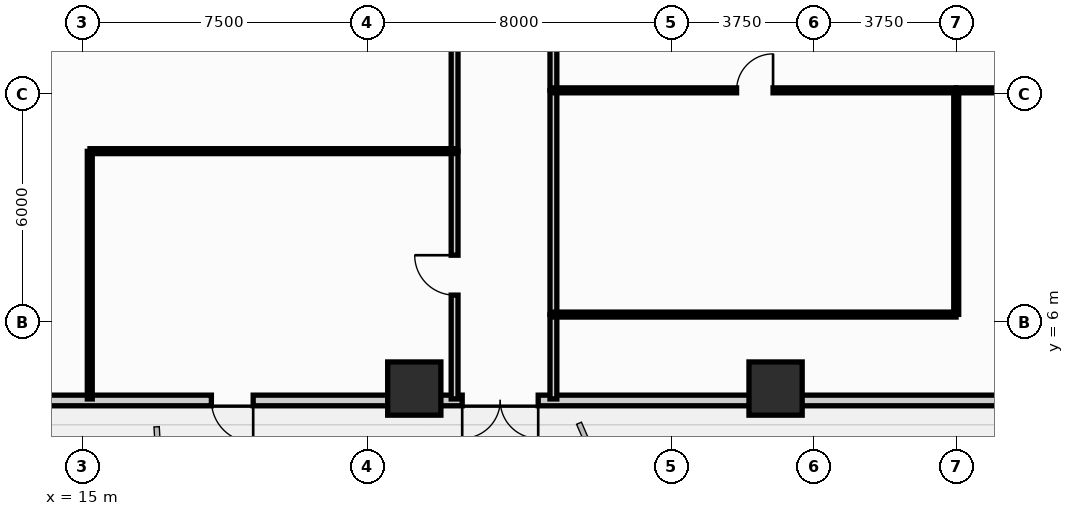
"""IFC4 building model, lengths in metres.
Left out: names, types, materials, properties, quantities, classifications, styles, units other than length and angle.
Written with IfcOpenShell. Run it as: python <this file> out.ifc"""

import sys

from ifc_helpers import new_model, si_unit, direction, frame, frame_2d, origin, origin_2d, place, context, subcontext, project, spatial, rectangle, hollow_rectangle, extrude, source, transform, mapped, element, fill, save


model = new_model("IFC4")
c1 = context("Model", 3, precision=1e-05, world=origin(), true_north=direction((0.0, 1.0)))
c2 = subcontext(c1, "Body", "Model", "MODEL_VIEW")
j1 = project(units=[si_unit("LENGTHUNIT", "METRE"), si_unit("PLANEANGLEUNIT", "RADIAN")], contexts=[c1])
p1 = place(None, origin())
s1 = spatial("IfcSite", under=j1, at=p1, CompositionType="ELEMENT")
p2 = place(p1, origin())
s2 = spatial("IfcBuilding", under=s1, at=p2, CompositionType="ELEMENT")
p3 = place(p2, origin())
s3 = spatial("IfcBuildingStorey", under=s2, at=p3, CompositionType="ELEMENT", Elevation=0.0)
m1 = source(origin(), c2, "Body", "SweptSolid", [
    extrude(hollow_rectangle(XDim=1.4, YDim=1.4, WallThickness=0.08, at=origin_2d()), origin(), (0.0, 0.0, 1.0), 5.401),
])
p4 = place(p3, frame((23.739, 4.253, 0.0), z_axis=(-0.013469326265, 0.019797197665, 0.999713283004), x_axis=(-0.826786039216, -0.562516528964, 0.0)))
e1 = element("IfcColumn", 1, at=p4, inside=s3, PredefinedType="COLUMN", context=c2, shape_type="MappedRepresentation", body=[
    mapped(m1, transform((0.0, 0.0, 0.0), scale=1.0)),
])
m2 = source(origin(), c2, "Body", "SweptSolid", [
    extrude(hollow_rectangle(XDim=1.4, YDim=1.4, WallThickness=0.08, at=origin_2d()), origin(), (0.0, 0.0, 1.0), 5.401),
])
p5 = place(p3, frame((33.246, 4.253, 0.0), z_axis=(-0.004475070213, 0.01979879549, 0.999793969498), x_axis=(-0.975394678041, -0.220465920379, 0.0)))
e2 = element("IfcColumn", 2, at=p5, inside=s3, PredefinedType="COLUMN", context=c2, shape_type="MappedRepresentation", body=[
    mapped(m2, transform((0.0, 0.0, 0.0), scale=1.0)),
])
p6 = place(p3, frame((45.0, 3.94, 0.0), z_axis=(0.0, 0.0, 1.0), x_axis=(-1.0, 0.0, 0.0)))
e3 = element("IfcWall", 3, at=p6, inside=s3, PredefinedType="STANDARD", context=c2, shape_type="SweptSolid", body=[
    extrude(rectangle(XDim=41.06, YDim=0.28, at=frame_2d((20.53, 0.0))), origin(), (0.0, 0.0, 1.0), 4.065),
])
p7 = place(p6, frame((18.0, 0.0, 0.0)))
e4 = element("IfcOpeningElement", 4, at=p7, cuts=e3, PredefinedType="OPENING", context=c2, shape_type="SweptSolid", body=[
    extrude(rectangle(XDim=2.0, YDim=2.4, at=frame_2d((1.0, 1.2))), frame((0.0, 0.152, 0.0), z_axis=(0.0, -1.0, 0.0), x_axis=(1.0, 0.0, 0.0)), (0.0, 0.0, 1.0), 0.304),
])
p8 = place(p6, frame((25.5, 0.0, 0.0)))
e5 = element("IfcOpeningElement", 5, at=p8, cuts=e3, PredefinedType="OPENING", context=c2, shape_type="SweptSolid", body=[
    extrude(rectangle(XDim=1.1, YDim=2.2, at=frame_2d((0.55, 1.1))), frame((0.0, 0.152, 0.0), z_axis=(0.0, -1.0, 0.0), x_axis=(1.0, 0.0, 0.0)), (0.0, 0.0, 1.0), 0.304),
])
p9 = place(p6, frame((33.16, 0.0, 1.0)))
e6 = element("IfcOpeningElement", 6, at=p9, cuts=e3, PredefinedType="OPENING", context=c2, shape_type="SweptSolid", body=[
    extrude(rectangle(XDim=2.4, YDim=1.95, at=frame_2d((1.2, 0.975))), frame((0.0, 0.152, 0.0), z_axis=(0.0, -1.0, 0.0), x_axis=(1.0, 0.0, 0.0)), (0.0, 0.0, 1.0), 0.304),
])
p10 = place(p3, frame((24.8, 10.505, 0.0), z_axis=(0.0, 0.0, 1.0), x_axis=(0.0, 1.0, 0.0)))
e7 = element("IfcWall", 7, at=p10, inside=s3, PredefinedType="PARTITIONING", context=c2, shape_type="SweptSolid", body=[
    extrude(rectangle(XDim=19.59, YDim=0.18, at=frame_2d((9.795, 0.0))), origin(), (0.0, 0.0, 1.0), 4.706),
])
p11 = place(p3, frame((24.8, 3.98, 0.0), z_axis=(0.0, 0.0, 1.0), x_axis=(0.0, 1.0, 0.0)))
e8 = element("IfcWall", 8, at=p11, inside=s3, PredefinedType="PARTITIONING", context=c2, shape_type="SweptSolid", body=[
    extrude(rectangle(XDim=6.515, YDim=0.18, at=frame_2d((3.258, 0.0))), origin(), (0.0, 0.0, 1.0), 5.08),
])
p12 = place(p11, frame((2.732, 0.0, 0.0)))
e9 = element("IfcOpeningElement", 9, at=p12, cuts=e8, PredefinedType="OPENING", context=c2, shape_type="SweptSolid", body=[
    extrude(rectangle(XDim=1.05, YDim=2.15, at=frame_2d((0.525, 1.075))), frame((0.0, 0.102, 0.0), z_axis=(0.0, -1.0, 0.0), x_axis=(1.0, 0.0, 0.0)), (0.0, 0.0, 1.0), 0.204),
])
p13 = place(p3, frame((27.4, 6.205, 0.0), z_axis=(0.0, 0.0, 1.0), x_axis=(0.0, 1.0, 0.0)))
e10 = element("IfcWall", 10, at=p13, inside=s3, PredefinedType="PARTITIONING", context=c2, shape_type="SweptSolid", body=[
    extrude(rectangle(XDim=5.89, YDim=0.18, at=frame_2d((2.945, 0.0))), origin(), (0.0, 0.0, 1.0), 5.08),
])
p14 = place(p3, frame((27.4, 3.98, 0.0), z_axis=(0.0, 0.0, 1.0), x_axis=(0.0, 1.0, 0.0)))
e11 = element("IfcWall", 11, at=p14, inside=s3, PredefinedType="PARTITIONING", context=c2, shape_type="SweptSolid", body=[
    extrude(rectangle(XDim=2.215, YDim=0.18, at=frame_2d((1.107, 0.0))), origin(), (0.0, 0.0, 1.0), 5.08),
])
p15 = place(p3, frame((27.4, 12.105, 0.0), z_axis=(0.0, 0.0, 1.0), x_axis=(0.0, 1.0, 0.0)))
e12 = element("IfcWall", 12, at=p15, inside=s3, PredefinedType="PARTITIONING", context=c2, shape_type="SweptSolid", body=[
    extrude(rectangle(XDim=2.19, YDim=0.18, at=frame_2d((1.095, 0.0))), origin(), (0.0, 0.0, 1.0), 5.08),
])
p16 = place(p3, frame((38.005, 12.1, 0.0), z_axis=(0.0, 0.0, 1.0), x_axis=(1.0, 0.0, 0.0)))
e13 = element("IfcWall", 13, at=p16, inside=s3, PredefinedType="PARTITIONING", context=c2, shape_type="SweptSolid", body=[
    extrude(rectangle(XDim=10.59, YDim=0.13, at=frame_2d((5.295, 0.0))), origin(), (0.0, 0.0, 1.0), 5.08),
])
p17 = place(p3, frame((27.405, 12.1, 0.0), z_axis=(0.0, 0.0, 1.0), x_axis=(1.0, 0.0, 0.0)))
e14 = element("IfcWall", 14, at=p17, inside=s3, PredefinedType="PARTITIONING", context=c2, shape_type="SweptSolid", body=[
    extrude(rectangle(XDim=10.59, YDim=0.13, at=frame_2d((5.295, 0.0))), origin(), (0.0, 0.0, 1.0), 5.08),
])
p18 = place(p17, frame((4.815, 0.0, 0.0)))
e15 = element("IfcOpeningElement", 15, at=p18, cuts=e14, PredefinedType="OPENING", context=c2, shape_type="SweptSolid", body=[
    extrude(rectangle(XDim=0.96, YDim=2.15, at=frame_2d((0.48, 1.075))), frame((0.0, 0.077, 0.0), z_axis=(0.0, -1.0, 0.0), x_axis=(1.0, 0.0, 0.0)), (0.0, 0.0, 1.0), 0.154),
])
p19 = place(p3, frame((27.405, 6.2, 0.0), z_axis=(0.0, 0.0, 1.0), x_axis=(1.0, 0.0, 0.0)))
e16 = element("IfcWall", 16, at=p19, inside=s3, PredefinedType="PARTITIONING", context=c2, shape_type="SweptSolid", body=[
    extrude(rectangle(XDim=10.59, YDim=0.13, at=frame_2d((5.295, 0.0))), origin(), (0.0, 0.0, 1.0), 5.08),
])
p20 = place(p3, frame((15.205, 10.5, 0.0), z_axis=(0.0, 0.0, 1.0), x_axis=(1.0, 0.0, 0.0)))
e17 = element("IfcWall", 17, at=p20, inside=s3, PredefinedType="PARTITIONING", context=c2, shape_type="SweptSolid", body=[
    extrude(rectangle(XDim=9.59, YDim=0.13, at=frame_2d((4.795, 0.0))), origin(), (0.0, 0.0, 1.0), 5.08),
])
p21 = place(p3, frame((15.2, 3.98, 0.0), z_axis=(0.0, 0.0, 1.0), x_axis=(0.0, 1.0, 0.0)))
e18 = element("IfcWall", 18, at=p21, inside=s3, PredefinedType="PARTITIONING", context=c2, shape_type="SweptSolid", body=[
    extrude(rectangle(XDim=6.515, YDim=0.13, at=frame_2d((3.258, 0.0))), origin(), (0.0, 0.0, 1.0), 5.08),
])
p22 = place(p3, frame((38.0, 6.205, 0.0), z_axis=(0.0, 0.0, 1.0), x_axis=(0.0, 1.0, 0.0)))
e19 = element("IfcWall", 19, at=p22, inside=s3, PredefinedType="PARTITIONING", context=c2, shape_type="SweptSolid", body=[
    extrude(rectangle(XDim=5.89, YDim=0.13, at=frame_2d((2.945, 0.0))), origin(), (0.0, 0.0, 1.0), 5.08),
])
p23 = place(p7, origin())
e20 = element("IfcDoor", 20, at=p23, inside=s3, OperationType="DOUBLE_DOOR_SINGLE_SWING", PredefinedType="DOOR", context=c2, shape_type="SweptSolid", body=[
    extrude(rectangle(XDim=2.0, YDim=2.4, at=frame_2d((1.0, 1.2))), frame((0.0, 0.025, 0.0), z_axis=(0.0, -1.0, 0.0), x_axis=(1.0, 0.0, 0.0)), (0.0, 0.0, 1.0), 0.05),
])
fill(e4, e20)
p24 = place(p8, origin())
e21 = element("IfcDoor", 21, at=p24, inside=s3, OperationType="SINGLE_SWING_LEFT", PredefinedType="DOOR", context=c2, shape_type="SweptSolid", body=[
    extrude(rectangle(XDim=1.1, YDim=2.2, at=frame_2d((0.55, 1.1))), frame((0.0, 0.025, 0.0), z_axis=(0.0, -1.0, 0.0), x_axis=(1.0, 0.0, 0.0)), (0.0, 0.0, 1.0), 0.05),
])
fill(e5, e21)
p25 = place(p12, origin())
e22 = element("IfcDoor", 22, at=p25, inside=s3, OperationType="SINGLE_SWING_RIGHT", PredefinedType="DOOR", context=c2, shape_type="SweptSolid", body=[
    extrude(rectangle(XDim=1.05, YDim=2.15, at=frame_2d((0.525, 1.075))), frame((0.0, 0.025, 0.0), z_axis=(0.0, -1.0, 0.0), x_axis=(1.0, 0.0, 0.0)), (0.0, 0.0, 1.0), 0.05),
])
fill(e9, e22)
p26 = place(p18, origin())
e23 = element("IfcDoor", 23, at=p26, inside=s3, OperationType="SINGLE_SWING_RIGHT", PredefinedType="DOOR", context=c2, shape_type="SweptSolid", body=[
    extrude(rectangle(XDim=0.96, YDim=2.15, at=frame_2d((0.48, 1.075))), frame((0.0, 0.025, 0.0), z_axis=(0.0, -1.0, 0.0), x_axis=(1.0, 0.0, 0.0)), (0.0, 0.0, 1.0), 0.05),
])
fill(e15, e23)
save(model, sys.argv[1])
